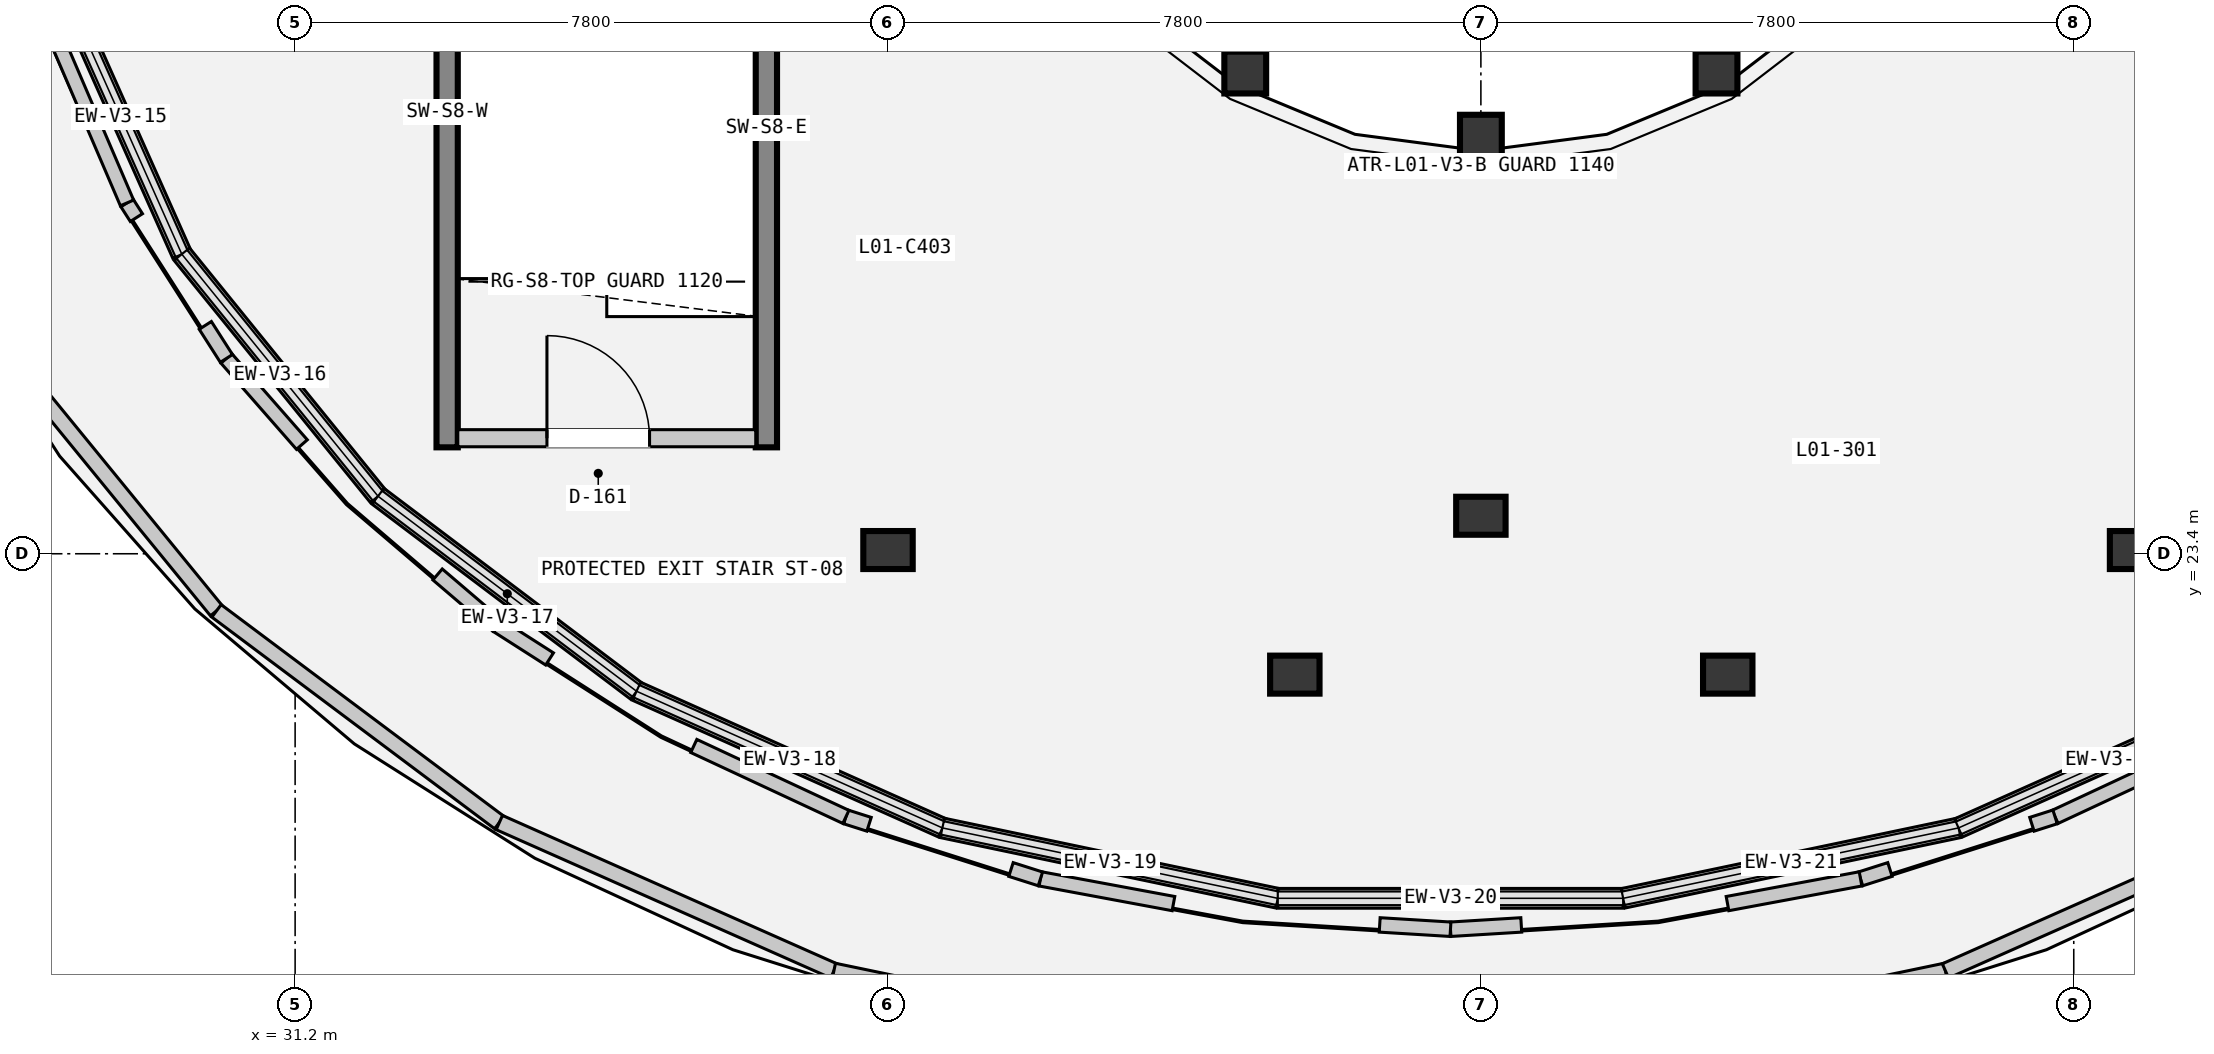
"""IFC4 building model, lengths in metres.
Left out: names, types, materials, properties, quantities, classifications, styles, units other than length and angle.
Written with IfcOpenShell. Run it as: python <this file> out.ifc"""

import sys

from ifc_helpers import new_model, si_unit, direction, frame, frame_2d, origin, origin_2d, place, context, subcontext, project, spatial, rectangle, circle, extrude, element, fill, save


model = new_model("IFC4")
c1 = context("Model", 3, precision=1e-05, world=origin(), true_north=direction((0.0, 1.0)))
c2 = subcontext(c1, "Body", "Model", "MODEL_VIEW")
j1 = project(units=[si_unit("LENGTHUNIT", "METRE"), si_unit("PLANEANGLEUNIT", "RADIAN")], contexts=[c1])
p1 = place(None, origin())
s1 = spatial("IfcSite", under=j1, at=p1, CompositionType="ELEMENT")
p2 = place(p1, origin())
s2 = spatial("IfcBuilding", under=s1, at=p2, CompositionType="ELEMENT")
p3 = place(p2, frame((0.0, 0.0, 5.4)))
s3 = spatial("IfcBuildingStorey", under=s2, at=p3, CompositionType="ELEMENT", Elevation=5.4)
for number, where, z_axis, x_axis in (
    (1, (43.7, 29.731, 0.0), (0.0, 0.0, 1.0), (1.0, 0.0, 0.0)),
    (2, (46.8, 28.9, 0.0), (0.0, 0.0, 1.0), (1.0, 0.0, 0.0)),
    (3, (49.9, 29.731, 0.0), (0.0, 0.0, 1.0), (1.0, 0.0, 0.0)),
):
    element("IfcColumn", number, at=place(p3, frame(where, z_axis=z_axis, x_axis=x_axis)), inside=s3, PredefinedType="COLUMN", context=c2, shape_type="SweptSolid", body=[
        extrude(circle(Radius=0.275, at=origin_2d()), origin(), (0.0, 0.0, 1.0), 5.7),
    ])
for number, where, z_axis, x_axis in (
    (4, (39.0, 23.449, 0.0), (0.0, 0.0, 1.0), (1.0, 0.0, 0.0)),
    (5, (44.352, 21.81, 0.0), (0.0, 0.0, 1.0), (1.0, 0.0, 0.0)),
    (6, (50.048, 21.81, 0.0), (0.0, 0.0, 1.0), (1.0, 0.0, 0.0)),
    (7, (55.4, 23.449, 0.0), (0.0, 0.0, 1.0), (1.0, 0.0, 0.0)),
    (8, (46.8, 23.9, 0.0), (0.0, 0.0, 1.0), (1.0, 0.0, 0.0)),
):
    element("IfcColumn", number, at=place(p3, frame(where, z_axis=z_axis, x_axis=x_axis)), inside=s3, PredefinedType="COLUMN", context=c2, shape_type="SweptSolid", body=[
        extrude(rectangle(XDim=0.65, YDim=0.5, at=origin_2d()), origin(), (0.0, 0.0, 1.0), 4.8),
    ])
for number, where, z_axis, x_axis in (
    (9, (33.2, 24.8, 0.0), (0.0, 0.0, 1.0), (0.0, 1.0, 0.0)),
    (10, (37.4, 24.8, 0.0), (0.0, 0.0, 1.0), (0.0, 1.0, 0.0)),
):
    element("IfcWall", number, at=place(p3, frame(where, z_axis=z_axis, x_axis=x_axis)), inside=s3, PredefinedType="SHEAR", context=c2, shape_type="SweptSolid", body=[
        extrude(rectangle(XDim=8.4, YDim=0.28, at=frame_2d((4.2, 0.0))), origin(), (0.0, 0.0, 1.0), 4.8),
    ])
p4 = place(p3, frame((28.098, 30.959, 0.0), z_axis=(0.0, 0.0, 1.0), x_axis=(0.406921913595, -0.91346294738, 0.0)))
e11 = element("IfcWall", 11, at=p4, inside=s3, PredefinedType="SOLIDWALL", context=c2, shape_type="SweptSolid", body=[
    extrude(rectangle(XDim=3.96, YDim=0.26, at=frame_2d((1.98, 0.0))), origin(), (0.0, 0.0, 1.0), 1.02),
])
p5 = place(p3, frame((29.709, 27.341, 0.0), z_axis=(0.0, 0.0, 1.0), x_axis=(0.629715516783, -0.776825828563, 0.0)))
e12 = element("IfcWall", 12, at=p5, inside=s3, PredefinedType="SOLIDWALL", context=c2, shape_type="SweptSolid", body=[
    extrude(rectangle(XDim=4.099, YDim=0.26, at=frame_2d((2.05, 0.0))), origin(), (0.0, 0.0, 1.0), 1.02),
])
p6 = place(p3, frame((32.291, 24.157, 0.0), z_axis=(0.0, 0.0, 1.0), x_axis=(0.798319095723, -0.602234689639, 0.0)))
e13 = element("IfcWall", 13, at=p6, inside=s3, PredefinedType="SOLIDWALL", context=c2, shape_type="SweptSolid", body=[
    extrude(rectangle(XDim=4.261, YDim=0.26, at=frame_2d((2.13, 0.0))), origin(), (0.0, 0.0, 1.0), 1.02),
])
p7 = place(p3, frame((35.692, 21.591, 0.0), z_axis=(0.0, 0.0, 1.0), x_axis=(0.91299422414, -0.407972482757, 0.0)))
e14 = element("IfcWall", 14, at=p7, inside=s3, PredefinedType="SOLIDWALL", context=c2, shape_type="SweptSolid", body=[
    extrude(rectangle(XDim=4.407, YDim=0.26, at=frame_2d((2.204, 0.0))), origin(), (0.0, 0.0, 1.0), 1.02),
])
p8 = place(p3, frame((39.716, 19.793, 0.0), z_axis=(0.0, 0.0, 1.0), x_axis=(0.9786765816, -0.205407275012, 0.0)))
e15 = element("IfcWall", 15, at=p8, inside=s3, PredefinedType="SOLIDWALL", context=c2, shape_type="SweptSolid", body=[
    extrude(rectangle(XDim=4.508, YDim=0.26, at=frame_2d((2.254, 0.0))), origin(), (0.0, 0.0, 1.0), 1.02),
])
p9 = place(p3, frame((44.128, 18.867, 0.0), z_axis=(0.0, 0.0, 1.0), x_axis=(1.0, 0.0, 0.0)))
e16 = element("IfcWall", 16, at=p9, inside=s3, PredefinedType="SOLIDWALL", context=c2, shape_type="SweptSolid", body=[
    extrude(rectangle(XDim=4.544, YDim=0.26, at=frame_2d((2.272, 0.0))), origin(), (0.0, 0.0, 1.0), 1.02),
])
p10 = place(p3, frame((48.672, 18.867, 0.0), z_axis=(0.0, 0.0, 1.0), x_axis=(0.9786765816, 0.205407275012, 0.0)))
e17 = element("IfcWall", 17, at=p10, inside=s3, PredefinedType="SOLIDWALL", context=c2, shape_type="SweptSolid", body=[
    extrude(rectangle(XDim=4.508, YDim=0.26, at=frame_2d((2.254, 0.0))), origin(), (0.0, 0.0, 1.0), 1.02),
])
p11 = place(p3, frame((53.084, 19.793, 0.0), z_axis=(0.0, 0.0, 1.0), x_axis=(0.912985003676, 0.407993116441, 0.0)))
e18 = element("IfcWall", 18, at=p11, inside=s3, PredefinedType="SOLIDWALL", context=c2, shape_type="SweptSolid", body=[
    extrude(rectangle(XDim=4.407, YDim=0.26, at=frame_2d((2.204, 0.0))), origin(), (0.0, 0.0, 1.0), 1.02),
])
p12 = place(p3, frame((27.342, 26.104, 0.0), z_axis=(0.0, 0.0, 1.0), x_axis=(0.632740194515, -0.774364156095, 0.0)))
e19 = element("IfcWall", 19, at=p12, inside=s3, PredefinedType="PARAPET", context=c2, shape_type="SweptSolid", body=[
    extrude(rectangle(XDim=4.463, YDim=0.205, at=frame_2d((2.231, 0.0))), origin(), (0.0, 0.0, 1.0), 0.92),
])
p13 = place(p3, frame((30.166, 22.648, 0.0), z_axis=(0.0, 0.0, 1.0), x_axis=(0.800579573698, -0.599226456507, 0.0)))
e20 = element("IfcWall", 20, at=p13, inside=s3, PredefinedType="PARAPET", context=c2, shape_type="SweptSolid", body=[
    extrude(rectangle(XDim=4.647, YDim=0.205, at=frame_2d((2.324, 0.0))), origin(), (0.0, 0.0, 1.0), 0.92),
])
p14 = place(p3, frame((33.886, 19.864, 0.0), z_axis=(0.0, 0.0, 1.0), x_axis=(0.91418544689, -0.40529614937, 0.0)))
e21 = element("IfcWall", 21, at=p14, inside=s3, PredefinedType="PARAPET", context=c2, shape_type="SweptSolid", body=[
    extrude(rectangle(XDim=4.815, YDim=0.205, at=frame_2d((2.407, 0.0))), origin(), (0.0, 0.0, 1.0), 0.92),
])
p15 = place(p3, frame((38.288, 17.912, 0.0), z_axis=(0.0, 0.0, 1.0), x_axis=(0.978995660806, -0.203881083289, 0.0)))
e22 = element("IfcWall", 22, at=p15, inside=s3, PredefinedType="PARAPET", context=c2, shape_type="SweptSolid", body=[
    extrude(rectangle(XDim=4.93, YDim=0.205, at=frame_2d((2.465, 0.0))), origin(), (0.0, 0.0, 1.0), 0.92),
])
p16 = place(p3, frame((48.085, 16.907, 0.0), z_axis=(0.0, 0.0, 1.0), x_axis=(0.978997719152, 0.203871199279, 0.0)))
e23 = element("IfcWall", 23, at=p16, inside=s3, PredefinedType="PARAPET", context=c2, shape_type="SweptSolid", body=[
    extrude(rectangle(XDim=4.93, YDim=0.205, at=frame_2d((2.465, 0.0))), origin(), (0.0, 0.0, 1.0), 0.92),
])
p17 = place(p3, frame((52.912, 17.912, 0.0), z_axis=(0.0, 0.0, 1.0), x_axis=(0.914177117028, 0.405314937675, 0.0)))
e24 = element("IfcWall", 24, at=p17, inside=s3, PredefinedType="PARAPET", context=c2, shape_type="SweptSolid", body=[
    extrude(rectangle(XDim=4.814, YDim=0.205, at=frame_2d((2.407, 0.0))), origin(), (0.0, 0.0, 1.0), 0.92),
])
p18 = place(p3, frame((33.34, 24.92, 0.0), z_axis=(0.0, 0.0, 1.0), x_axis=(1.0, 0.0, 0.0)))
e25 = element("IfcWall", 25, at=p18, inside=s3, PredefinedType="PARTITIONING", context=c2, shape_type="SweptSolid", body=[
    extrude(rectangle(XDim=3.92, YDim=0.225, at=frame_2d((1.96, 0.0))), origin(), (0.0, 0.0, 1.0), 3.51),
])
p19 = place(p18, frame((1.173, 0.0, 0.0)))
e26 = element("IfcOpeningElement", 26, at=p19, cuts=e25, PredefinedType="OPENING", context=c2, shape_type="SweptSolid", body=[
    extrude(rectangle(XDim=1.35, YDim=2.2, at=frame_2d((0.675, 1.1))), frame((0.0, 0.123, 0.0), z_axis=(0.0, -1.0, 0.0), x_axis=(1.0, 0.0, 0.0)), (0.0, 0.0, 1.0), 0.245),
])
p20 = place(p3, frame((56.355, 20.871, 0.0), z_axis=(0.0, 0.0, 1.0), x_axis=(-0.906279152492, -0.422679663289, 0.0)))
e27 = element("IfcWall", 27, at=p20, inside=s3, PredefinedType="PARAPET", context=c2, shape_type="SweptSolid", body=[
    extrude(rectangle(XDim=2.208, YDim=0.19, at=frame_2d((1.104, 0.0))), origin(), (0.0, 0.0, 1.0), 1.12),
])
p21 = place(p3, frame((54.354, 19.938, 0.0), z_axis=(0.0, 0.0, 1.0), x_axis=(-0.952725053414, -0.303833791073, 0.0)))
e28 = element("IfcWall", 28, at=p21, inside=s3, PredefinedType="PARAPET", context=c2, shape_type="SweptSolid", body=[
    extrude(rectangle(XDim=0.32, YDim=0.19, at=frame_2d((0.16, 0.0))), origin(), (0.0, 0.0, 1.0), 1.12),
])
p22 = place(p3, frame((52.182, 19.246, 0.0), z_axis=(0.0, 0.0, 1.0), x_axis=(-0.952688821483, -0.303947379363, 0.0)))
e29 = element("IfcWall", 29, at=p22, inside=s3, PredefinedType="PARAPET", context=c2, shape_type="SweptSolid", body=[
    extrude(rectangle(XDim=0.406, YDim=0.19, at=frame_2d((0.203, 0.0))), origin(), (0.0, 0.0, 1.0), 1.12),
])
p23 = place(p3, frame((51.795, 19.123, 0.0), z_axis=(0.0, 0.0, 1.0), x_axis=(-0.983169031577, -0.182698263122, 0.0)))
e30 = element("IfcWall", 30, at=p23, inside=s3, PredefinedType="PARAPET", context=c2, shape_type="SweptSolid", body=[
    extrude(rectangle(XDim=1.78, YDim=0.19, at=frame_2d((0.89, 0.0))), origin(), (0.0, 0.0, 1.0), 1.12),
])
p24 = place(p3, frame((47.331, 18.517, 0.0), z_axis=(0.0, 0.0, 1.0), x_axis=(-0.998140141704, -0.060961114814, 0.0)))
e31 = element("IfcWall", 31, at=p24, inside=s3, PredefinedType="PARAPET", context=c2, shape_type="SweptSolid", body=[
    extrude(rectangle(XDim=0.933, YDim=0.19, at=frame_2d((0.467, 0.0))), origin(), (0.0, 0.0, 1.0), 1.12),
])
p25 = place(p3, frame((46.4, 18.46, 0.0), z_axis=(0.0, 0.0, 1.0), x_axis=(-0.998139169017, 0.060977038904, 0.0)))
e32 = element("IfcWall", 32, at=p25, inside=s3, PredefinedType="PARAPET", context=c2, shape_type="SweptSolid", body=[
    extrude(rectangle(XDim=0.933, YDim=0.19, at=frame_2d((0.466, 0.0))), origin(), (0.0, 0.0, 1.0), 1.12),
])
p26 = place(p3, frame((42.755, 18.797, 0.0), z_axis=(0.0, 0.0, 1.0), x_axis=(-0.983169031577, 0.182698263122, 0.0)))
e33 = element("IfcWall", 33, at=p26, inside=s3, PredefinedType="PARAPET", context=c2, shape_type="SweptSolid", body=[
    extrude(rectangle(XDim=1.78, YDim=0.19, at=frame_2d((0.89, 0.0))), origin(), (0.0, 0.0, 1.0), 1.12),
])
p27 = place(p3, frame((41.005, 19.123, 0.0), z_axis=(0.0, 0.0, 1.0), x_axis=(-0.952744267711, 0.303773534633, 0.0)))
e34 = element("IfcWall", 34, at=p27, inside=s3, PredefinedType="PARAPET", context=c2, shape_type="SweptSolid", body=[
    extrude(rectangle(XDim=0.407, YDim=0.19, at=frame_2d((0.203, 0.0))), origin(), (0.0, 0.0, 1.0), 1.12),
])
p28 = place(p3, frame((38.75, 19.841, 0.0), z_axis=(0.0, 0.0, 1.0), x_axis=(-0.952725053414, 0.303833791073, 0.0)))
e35 = element("IfcWall", 35, at=p28, inside=s3, PredefinedType="PARAPET", context=c2, shape_type="SweptSolid", body=[
    extrude(rectangle(XDim=0.32, YDim=0.19, at=frame_2d((0.16, 0.0))), origin(), (0.0, 0.0, 1.0), 1.12),
])
p29 = place(p3, frame((38.446, 19.938, 0.0), z_axis=(0.0, 0.0, 1.0), x_axis=(-0.906259396673, 0.422722019703, 0.0)))
e36 = element("IfcWall", 36, at=p29, inside=s3, PredefinedType="PARAPET", context=c2, shape_type="SweptSolid", body=[
    extrude(rectangle(XDim=2.208, YDim=0.19, at=frame_2d((1.104, 0.0))), origin(), (0.0, 0.0, 1.0), 1.12),
])
p30 = place(p3, frame((34.548, 22.016, 0.0), z_axis=(0.0, 0.0, 1.0), x_axis=(-0.84238587673, 0.53887478572, 0.0)))
e37 = element("IfcWall", 37, at=p30, inside=s3, PredefinedType="PARAPET", context=c2, shape_type="SweptSolid", body=[
    extrude(rectangle(XDim=0.813, YDim=0.19, at=frame_2d((0.407, 0.0))), origin(), (0.0, 0.0, 1.0), 1.12),
])
p31 = place(p3, frame((33.863, 22.454, 0.0), z_axis=(0.0, 0.0, 1.0), x_axis=(-0.760368834137, 0.649491521171, 0.0)))
e38 = element("IfcWall", 38, at=p31, inside=s3, PredefinedType="PARAPET", context=c2, shape_type="SweptSolid", body=[
    extrude(rectangle(XDim=1.037, YDim=0.19, at=frame_2d((0.519, 0.0))), origin(), (0.0, 0.0, 1.0), 1.12),
])
p32 = place(p3, frame((31.289, 24.836, 0.0), z_axis=(0.0, 0.0, 1.0), x_axis=(-0.659249852707, 0.751923953406, 0.0)))
e39 = element("IfcWall", 39, at=p32, inside=s3, PredefinedType="PARAPET", context=c2, shape_type="SweptSolid", body=[
    extrude(rectangle(XDim=1.507, YDim=0.19, at=frame_2d((0.753, 0.0))), origin(), (0.0, 0.0, 1.0), 1.12),
])
p33 = place(p3, frame((30.296, 25.969, 0.0), z_axis=(0.0, 0.0, 1.0), x_axis=(-0.538099841889, 0.842881106776, 0.0)))
e40 = element("IfcWall", 40, at=p33, inside=s3, PredefinedType="PARAPET", context=c2, shape_type="SweptSolid", body=[
    extrude(rectangle(XDim=0.516, YDim=0.19, at=frame_2d((0.258, 0.0))), origin(), (0.0, 0.0, 1.0), 1.12),
])
p34 = place(p3, frame((29.112, 27.822, 0.0), z_axis=(0.0, 0.0, 1.0), x_axis=(-0.538872361831, 0.842387427289, 0.0)))
e41 = element("IfcWall", 41, at=p34, inside=s3, PredefinedType="PARAPET", context=c2, shape_type="SweptSolid", body=[
    extrude(rectangle(XDim=0.229, YDim=0.19, at=frame_2d((0.115, 0.0))), origin(), (0.0, 0.0, 1.0), 1.12),
])
p35 = place(p3, frame((28.988, 28.015, 0.0), z_axis=(0.0, 0.0, 1.0), x_axis=(-0.394299302617, 0.918982078147, 0.0)))
e42 = element("IfcWall", 42, at=p35, inside=s3, PredefinedType="PARAPET", context=c2, shape_type="SweptSolid", body=[
    extrude(rectangle(XDim=2.481, YDim=0.19, at=frame_2d((1.24, 0.0))), origin(), (0.0, 0.0, 1.0), 1.12),
])
p36 = place(p19, origin())
e43 = element("IfcDoor", 43, at=p36, inside=s3, OperationType="SINGLE_SWING_RIGHT", PredefinedType="DOOR", context=c2, shape_type="SweptSolid", body=[
    extrude(rectangle(XDim=1.35, YDim=2.2, at=frame_2d((0.675, 1.1))), frame((0.0, 0.025, 0.0), z_axis=(0.0, -1.0, 0.0), x_axis=(1.0, 0.0, 0.0)), (0.0, 0.0, 1.0), 0.05),
])
fill(e26, e43)
save(model, sys.argv[1])
